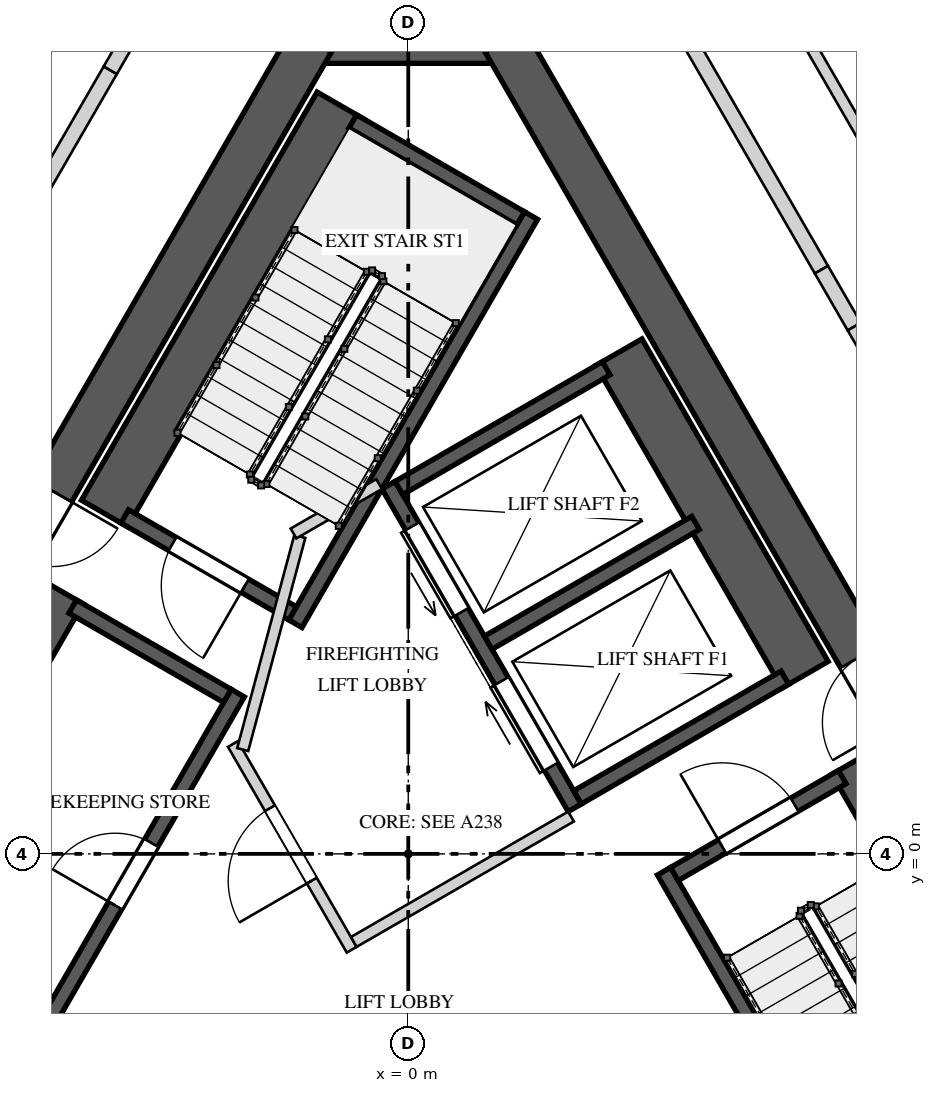
"""IFC4 building model, lengths in metres.
Left out: names, types, materials, properties, quantities, classifications, styles, units other than length and angle.
Written with IfcOpenShell. Run it as: python <this file> out.ifc"""

import sys

from ifc_helpers import new_model, si_unit, direction, frame, frame_2d, origin, place, context, subcontext, project, spatial, rectangle, extrude, element, fill, save


model = new_model("IFC4")
c1 = context("Model", 3, precision=1e-05, world=origin(), true_north=direction((0.0, 1.0)))
c2 = subcontext(c1, "Body", "Model", "MODEL_VIEW")
j1 = project(units=[si_unit("LENGTHUNIT", "METRE"), si_unit("PLANEANGLEUNIT", "RADIAN")], contexts=[c1])
p1 = place(None, origin())
s1 = spatial("IfcSite", under=j1, at=p1, CompositionType="ELEMENT")
p2 = place(p1, origin())
s2 = spatial("IfcBuilding", under=s1, at=p2, CompositionType="ELEMENT")
p3 = place(p2, frame((0.0, 0.0, 274.4)))
s3 = spatial("IfcBuildingStorey", under=s2, at=p3, CompositionType="ELEMENT", Elevation=274.4)
p4 = place(p3, frame((1.443, 10.7, 0.0), z_axis=(0.0, 0.0, 1.0), x_axis=(-1.0, 0.0, 0.0)))
e1 = element("IfcWall", 1, at=p4, inside=s3, PredefinedType="SHEAR", context=c2, shape_type="SweptSolid", body=[
    extrude(rectangle(XDim=2.887, YDim=0.6, at=frame_2d((1.443, 0.0))), origin(), (0.0, 0.0, 1.0), 4.0),
])
p5 = place(p3, frame((-1.27, 10.7, 0.0), z_axis=(0.0, 0.0, 1.0), x_axis=(-0.499999536116, -0.866025671608, 0.0)))
e2 = element("IfcWall", 2, at=p5, inside=s3, PredefinedType="SHEAR", context=c2, shape_type="SweptSolid", body=[
    extrude(rectangle(XDim=17.263, YDim=0.6, at=frame_2d((8.631, 0.0))), origin(), (0.0, 0.0, 1.0), 4.0),
])
p6 = place(p5, frame((6.836, 0.0, 0.0)))
e3 = element("IfcOpeningElement", 3, at=p6, cuts=e2, PredefinedType="OPENING", context=c2, shape_type="SweptSolid", body=[
    extrude(rectangle(XDim=1.0, YDim=2.4, at=frame_2d((0.5, 1.2))), frame((0.0, 0.31, 0.0), z_axis=(0.0, -1.0, 0.0), x_axis=(1.0, 0.0, 0.0)), (0.0, 0.0, 1.0), 0.62),
])
p7 = place(p5, frame((15.034, 0.0, 0.0)))
e4 = element("IfcOpeningElement", 4, at=p7, cuts=e2, PredefinedType="OPENING", context=c2, shape_type="SweptSolid", body=[
    extrude(rectangle(XDim=0.8, YDim=2.1, at=frame_2d((0.4, 1.05))), frame((0.0, 0.31, 0.0), z_axis=(0.0, -1.0, 0.0), x_axis=(1.0, 0.0, 0.0)), (0.0, 0.0, 1.0), 0.62),
])
p8 = place(p3, frame((9.902, -4.25, 0.0), z_axis=(0.0, 0.0, 1.0), x_axis=(-0.499999536116, 0.866025671608, 0.0)))
e5 = element("IfcWall", 5, at=p8, inside=s3, PredefinedType="SHEAR", context=c2, shape_type="SweptSolid", body=[
    extrude(rectangle(XDim=17.263, YDim=0.6, at=frame_2d((8.631, 0.0))), origin(), (0.0, 0.0, 1.0), 4.0),
])
p9 = place(p8, frame((6.906, 0.0, 0.0)))
e6 = element("IfcOpeningElement", 6, at=p9, cuts=e5, PredefinedType="OPENING", context=c2, shape_type="SweptSolid", body=[
    extrude(rectangle(XDim=1.0, YDim=2.4, at=frame_2d((0.5, 1.2))), frame((0.0, 0.31, 0.0), z_axis=(0.0, -1.0, 0.0), x_axis=(1.0, 0.0, 0.0)), (0.0, 0.0, 1.0), 0.62),
])
p10 = place(p3, frame((-0.896, 9.847, 0.0), z_axis=(0.0, 0.0, 1.0), x_axis=(-0.500009909098, -0.866019682689, 0.0)))
e7 = element("IfcWall", 7, at=p10, inside=s3, PredefinedType="SOLIDWALL", context=c2, shape_type="SweptSolid", body=[
    extrude(rectangle(XDim=6.2, YDim=0.7, at=frame_2d((3.1, 0.0))), origin(), (0.0, 0.0, 1.0), 3.65),
])
p11 = place(p3, frame((1.615, 8.397, 0.0), z_axis=(0.0, 0.0, 1.0), x_axis=(-0.500009909098, -0.866019682689, 0.0)))
e8 = element("IfcWall", 8, at=p11, inside=s3, PredefinedType="SOLIDWALL", context=c2, shape_type="SweptSolid", body=[
    extrude(rectangle(XDim=6.2, YDim=0.2, at=frame_2d((3.1, 0.0))), origin(), (0.0, 0.0, 1.0), 3.65),
])
p12 = place(p3, frame((1.479, 8.361, 0.0), z_axis=(0.0, 0.0, 1.0), x_axis=(-0.865989465428, 0.500062241894, 0.0)))
e9 = element("IfcWall", 9, at=p12, inside=s3, PredefinedType="SOLIDWALL", context=c2, shape_type="SweptSolid", body=[
    extrude(rectangle(XDim=2.55, YDim=0.2, at=frame_2d((1.275, 0.0))), origin(), (0.0, 0.0, 1.0), 3.65),
])
p13 = place(p3, frame((-1.521, 3.165, 0.0), z_axis=(0.0, 0.0, 1.0), x_axis=(-0.866030925526, 0.499990435942, 0.0)))
e10 = element("IfcWall", 10, at=p13, inside=s3, PredefinedType="SOLIDWALL", context=c2, shape_type="SweptSolid", body=[
    extrude(rectangle(XDim=2.55, YDim=0.2, at=frame_2d((1.275, 0.0))), origin(), (0.0, 0.0, 1.0), 3.65),
])
p14 = place(p13, frame((0.725, 0.0, 0.0)))
e11 = element("IfcOpeningElement", 11, at=p14, cuts=e10, PredefinedType="OPENING", context=c2, shape_type="SweptSolid", body=[
    extrude(rectangle(XDim=1.1, YDim=2.4, at=frame_2d((0.55, 1.2))), frame((0.0, 0.11, 0.0), z_axis=(0.0, -1.0, 0.0), x_axis=(1.0, 0.0, 0.0)), (0.0, 0.0, 1.0), 0.22),
])
p15 = place(p3, frame((8.976, -4.147, 0.0), z_axis=(0.0, 0.0, 1.0), x_axis=(-0.49998037582, 0.866036733513, 0.0)))
e12 = element("IfcWall", 12, at=p15, inside=s3, PredefinedType="SOLIDWALL", context=c2, shape_type="SweptSolid", body=[
    extrude(rectangle(XDim=6.2, YDim=0.7, at=frame_2d((3.1, 0.0))), origin(), (0.0, 0.0, 1.0), 3.65),
])
p16 = place(p3, frame((6.465, -5.597, 0.0), z_axis=(0.0, 0.0, 1.0), x_axis=(-0.49998037582, 0.866036733513, 0.0)))
e13 = element("IfcWall", 13, at=p16, inside=s3, PredefinedType="SOLIDWALL", context=c2, shape_type="SweptSolid", body=[
    extrude(rectangle(XDim=6.2, YDim=0.2, at=frame_2d((3.1, 0.0))), origin(), (0.0, 0.0, 1.0), 3.65),
])
p17 = place(p3, frame((3.501, -0.265, 0.0), z_axis=(0.0, 0.0, 1.0), x_axis=(0.866030925526, 0.499990435942, 0.0)))
e14 = element("IfcWall", 14, at=p17, inside=s3, PredefinedType="SOLIDWALL", context=c2, shape_type="SweptSolid", body=[
    extrude(rectangle(XDim=2.55, YDim=0.2, at=frame_2d((1.275, 0.0))), origin(), (0.0, 0.0, 1.0), 3.65),
])
p18 = place(p17, frame((0.725, 0.0, 0.0)))
e15 = element("IfcOpeningElement", 15, at=p18, cuts=e14, PredefinedType="OPENING", context=c2, shape_type="SweptSolid", body=[
    extrude(rectangle(XDim=1.1, YDim=2.4, at=frame_2d((0.55, 1.2))), frame((0.0, 0.11, 0.0), z_axis=(0.0, -1.0, 0.0), x_axis=(1.0, 0.0, 0.0)), (0.0, 0.0, 1.0), 0.22),
])
p19 = place(p3, frame((-4.993, -2.648, 0.0), z_axis=(0.0, 0.0, 1.0), x_axis=(0.499996545922, 0.866027397988, 0.0)))
e16 = element("IfcWall", 16, at=p19, inside=s3, PredefinedType="SOLIDWALL", context=c2, shape_type="SweptSolid", body=[
    extrude(rectangle(XDim=5.5, YDim=0.2, at=frame_2d((2.75, 0.0))), origin(), (0.0, 0.0, 1.0), 3.65),
])
p20 = place(p19, frame((2.275, 0.0, 0.0)))
e17 = element("IfcOpeningElement", 17, at=p20, cuts=e16, PredefinedType="OPENING", context=c2, shape_type="SweptSolid", body=[
    extrude(rectangle(XDim=0.95, YDim=2.4, at=frame_2d((0.475, 1.2))), frame((0.0, 0.11, 0.0), z_axis=(0.0, -1.0, 0.0), x_axis=(1.0, 0.0, 0.0)), (0.0, 0.0, 1.0), 0.22),
])
p21 = place(p3, frame((-4.581, 3.465, 0.0), z_axis=(0.0, 0.0, 1.0), x_axis=(-0.499996545922, -0.866027397988, 0.0)))
e18 = element("IfcWall", 18, at=p21, inside=s3, PredefinedType="SOLIDWALL", context=c2, shape_type="SweptSolid", body=[
    extrude(rectangle(XDim=5.5, YDim=0.7, at=frame_2d((2.75, 0.0))), origin(), (0.0, 0.0, 1.0), 3.65),
])
p22 = place(p3, frame((-2.38, 2.078, 0.0), z_axis=(0.0, 0.0, 1.0), x_axis=(-0.866061024631, 0.499938297808, 0.0)))
e19 = element("IfcWall", 19, at=p22, inside=s3, PredefinedType="SOLIDWALL", context=c2, shape_type="SweptSolid", body=[
    extrude(rectangle(XDim=2.35, YDim=0.2, at=frame_2d((1.175, 0.0))), origin(), (0.0, 0.0, 1.0), 3.65),
])
p23 = place(p3, frame((2.19, 0.606, 0.0), z_axis=(0.0, 0.0, 1.0), x_axis=(-0.500002801628, 0.866023786258, 0.0)))
e20 = element("IfcWall", 20, at=p23, inside=s3, PredefinedType="SOLIDWALL", context=c2, shape_type="SweptSolid", body=[
    extrude(rectangle(XDim=4.9, YDim=0.2, at=frame_2d((2.45, 0.0))), origin(), (0.0, 0.0, 1.0), 3.65),
])
p24 = place(p23, frame((0.625, 0.0, 0.0)))
e21 = element("IfcOpeningElement", 21, at=p24, cuts=e20, PredefinedType="OPENING", context=c2, shape_type="SweptSolid", body=[
    extrude(rectangle(XDim=1.3, YDim=2.1, at=frame_2d((0.65, 1.05))), frame((0.0, 0.11, 0.0), z_axis=(0.0, -1.0, 0.0), x_axis=(1.0, 0.0, 0.0)), (0.0, 0.0, 1.0), 0.22),
])
p25 = place(p23, frame((2.975, 0.0, 0.0)))
e22 = element("IfcOpeningElement", 22, at=p25, cuts=e20, PredefinedType="OPENING", context=c2, shape_type="SweptSolid", body=[
    extrude(rectangle(XDim=1.3, YDim=2.1, at=frame_2d((0.65, 1.05))), frame((0.0, 0.11, 0.0), z_axis=(0.0, -1.0, 0.0), x_axis=(1.0, 0.0, 0.0)), (0.0, 0.0, 1.0), 0.22),
])
p26 = place(p3, frame((5.221, 2.356, 0.0), z_axis=(0.0, 0.0, 1.0), x_axis=(-0.500040169509, 0.866002210665, 0.0)))
e23 = element("IfcWall", 23, at=p26, inside=s3, PredefinedType="SOLIDWALL", context=c2, shape_type="SweptSolid", body=[
    extrude(rectangle(XDim=4.9, YDim=0.7, at=frame_2d((2.45, 0.0))), origin(), (0.0, 0.0, 1.0), 3.65),
])
for number, where, z_axis, x_axis in (
    (24, (2.227, 0.743, 0.0), (0.0, 0.0, 1.0), (0.866, 0.5, 0.0)),
    (25, (1.052, 2.778, 0.0), (0.0, 0.0, 1.0), (0.866, 0.5, 0.0)),
    (26, (-0.123, 4.813, 0.0), (0.0, 0.0, 1.0), (0.866, 0.5, 0.0)),
):
    element("IfcWall", number, at=place(p3, frame(where, z_axis=z_axis, x_axis=x_axis)), inside=s3, PredefinedType="SOLIDWALL", context=c2, shape_type="SweptSolid", body=[
        extrude(rectangle(XDim=3.15, YDim=0.2, at=frame_2d((1.575, 0.0))), origin(), (0.0, 0.0, 1.0), 3.65),
    ])
p27 = place(p3, frame((-0.744, -1.261, 0.0), z_axis=(0.0, 0.0, 1.0), x_axis=(-0.500004234368, 0.866022959057, 0.0)))
e27 = element("IfcWall", 27, at=p27, inside=s3, PredefinedType="PARTITIONING", context=c2, shape_type="SweptSolid", body=[
    extrude(rectangle(XDim=3.125, YDim=0.15, at=frame_2d((1.562, 0.0))), origin(), (0.0, 0.0, 1.0), 3.65),
])
p28 = place(p27, frame((1.05, 0.0, 0.0)))
e28 = element("IfcOpeningElement", 28, at=p28, cuts=e27, PredefinedType="OPENING", context=c2, shape_type="SweptSolid", body=[
    extrude(rectangle(XDim=1.1, YDim=2.4, at=frame_2d((0.55, 1.2))), frame((0.0, 0.085, 0.0), z_axis=(0.0, -1.0, 0.0), x_axis=(1.0, 0.0, 0.0)), (0.0, 0.0, 1.0), 0.17),
])
p29 = place(p3, frame((-0.717, -1.159, 0.0), z_axis=(0.0, 0.0, 1.0), x_axis=(0.866008176907, 0.50002983664, 0.0)))
e29 = element("IfcWall", 29, at=p29, inside=s3, PredefinedType="PARTITIONING", context=c2, shape_type="SweptSolid", body=[
    extrude(rectangle(XDim=3.3, YDim=0.15, at=frame_2d((1.65, 0.0))), origin(), (0.0, 0.0, 1.0), 3.65),
])
p30 = place(p3, frame((-2.178, 1.372, 0.0), z_axis=(0.0, 0.0, 1.0), x_axis=(0.258808958833, 0.96592852884, 0.0)))
e30 = element("IfcWall", 30, at=p30, inside=s3, PredefinedType="PARTITIONING", context=c2, shape_type="SweptSolid", body=[
    extrude(rectangle(XDim=2.903, YDim=0.15, at=frame_2d((1.451, 0.0))), origin(), (0.0, 0.0, 1.0), 3.65),
])
p31 = place(p3, frame((-1.51, 4.215, 0.0), z_axis=(0.0, 0.0, 1.0), x_axis=(0.866085525409, 0.49989585183, 0.0)))
e31 = element("IfcWall", 31, at=p31, inside=s3, PredefinedType="PARTITIONING", context=c2, shape_type="SweptSolid", body=[
    extrude(rectangle(XDim=1.3, YDim=0.15, at=frame_2d((0.65, 0.0))), origin(), (0.0, 0.0, 1.0), 3.65),
])
p32 = place(p3, frame((-6.925, 7.806, 0.0), z_axis=(0.0, 0.0, 1.0), x_axis=(0.500024628788, 0.86601118388, 0.0)))
e32 = element("IfcWall", 32, at=p32, inside=s3, PredefinedType="PARTITIONING", context=c2, shape_type="SweptSolid", body=[
    extrude(rectangle(XDim=4.406, YDim=0.15, at=frame_2d((2.203, 0.0))), origin(), (0.0, 0.0, 1.0), 3.65),
])
p33 = place(p32, frame((0.524, 0.0, 0.0)))
e33 = element("IfcOpeningElement", 33, at=p33, cuts=e32, PredefinedType="OPENING", context=c2, shape_type="SweptSolid", body=[
    extrude(rectangle(XDim=0.95, YDim=2.4, at=frame_2d((0.475, 1.2))), frame((0.0, 0.085, 0.0), z_axis=(0.0, -1.0, 0.0), x_axis=(1.0, 0.0, 0.0)), (0.0, 0.0, 1.0), 0.17),
])
p34 = place(p3, frame((3.513, 13.715, 0.0), z_axis=(0.0, 0.0, 1.0), x_axis=(0.500019542665, -0.866014120528, 0.0)))
e34 = element("IfcWall", 34, at=p34, inside=s3, PredefinedType="PARTITIONING", context=c2, shape_type="SweptSolid", body=[
    extrude(rectangle(XDim=5.643, YDim=0.15, at=frame_2d((2.822, 0.0))), origin(), (0.0, 0.0, 1.0), 3.65),
])
p35 = place(p34, frame((2.422, 0.0, 0.0)))
e35 = element("IfcOpeningElement", 35, at=p35, cuts=e34, PredefinedType="OPENING", context=c2, shape_type="SweptSolid", body=[
    extrude(rectangle(XDim=0.95, YDim=2.4, at=frame_2d((0.475, 1.2))), frame((0.0, 0.085, 0.0), z_axis=(0.0, -1.0, 0.0), x_axis=(1.0, 0.0, 0.0)), (0.0, 0.0, 1.0), 0.17),
])
p36 = place(p3, frame((-5.947, 6.801, 0.0), z_axis=(0.0, 0.0, 1.0), x_axis=(0.500007556608, 0.866021040931, 0.0)))
e36 = element("IfcWall", 36, at=p36, inside=s3, PredefinedType="SOLIDWALL", context=c2, shape_type="SweptSolid", body=[
    extrude(rectangle(XDim=4.052, YDim=0.2, at=frame_2d((2.026, 0.0))), origin(), (0.0, 0.0, 1.0), 3.65),
])
p37 = place(p3, frame((-3.92, 10.31, 0.0), z_axis=(0.0, 0.0, 1.0), x_axis=(0.500102178127, 0.865966403178, 0.0)))
e37 = element("IfcWall", 37, at=p37, inside=s3, PredefinedType="SOLIDWALL", context=c2, shape_type="SweptSolid", body=[
    extrude(rectangle(XDim=0.927, YDim=0.2, at=frame_2d((0.464, 0.0))), origin(), (0.0, 0.0, 1.0), 2.95),
])
p38 = place(p3, frame((3.077, 11.771, 0.0), z_axis=(0.0, 0.0, 1.0), x_axis=(0.500007683529, -0.866020967652, 0.0)))
e38 = element("IfcWall", 38, at=p38, inside=s3, PredefinedType="SOLIDWALL", context=c2, shape_type="SweptSolid", body=[
    extrude(rectangle(XDim=4.717, YDim=0.2, at=frame_2d((2.359, 0.0))), origin(), (0.0, 0.0, 1.0), 3.65),
])
p39 = place(p3, frame((5.436, 7.686, 0.0), z_axis=(0.0, 0.0, 1.0), x_axis=(0.500056482814, -0.86599279096, 0.0)))
e39 = element("IfcWall", 39, at=p39, inside=s3, PredefinedType="SOLIDWALL", context=c2, shape_type="SweptSolid", body=[
    extrude(rectangle(XDim=0.865, YDim=0.2, at=frame_2d((0.432, 0.0))), origin(), (0.0, 0.0, 1.0), 2.75),
])
p40 = place(p3, frame((5.868, 6.937, 0.0), z_axis=(0.0, 0.0, 1.0), x_axis=(0.499857464265, -0.866107681191, 0.0)))
e40 = element("IfcWall", 40, at=p40, inside=s3, PredefinedType="SOLIDWALL", context=c2, shape_type="SweptSolid", body=[
    extrude(rectangle(XDim=0.939, YDim=0.2, at=frame_2d((0.47, 0.0))), origin(), (0.0, 0.0, 1.0), 3.65),
])
p41 = place(p14, origin())
e41 = element("IfcDoor", 41, at=p41, inside=s3, OperationType="SINGLE_SWING_RIGHT", PredefinedType="DOOR", context=c2, shape_type="SweptSolid", body=[
    extrude(rectangle(XDim=1.1, YDim=2.4, at=frame_2d((0.55, 1.2))), frame((0.0, 0.025, 0.0), z_axis=(0.0, -1.0, 0.0), x_axis=(1.0, 0.0, 0.0)), (0.0, 0.0, 1.0), 0.05),
])
fill(e11, e41)
p42 = place(p18, origin())
e42 = element("IfcDoor", 42, at=p42, inside=s3, OperationType="SINGLE_SWING_RIGHT", PredefinedType="DOOR", context=c2, shape_type="SweptSolid", body=[
    extrude(rectangle(XDim=1.1, YDim=2.4, at=frame_2d((0.55, 1.2))), frame((0.0, 0.025, 0.0), z_axis=(0.0, -1.0, 0.0), x_axis=(1.0, 0.0, 0.0)), (0.0, 0.0, 1.0), 0.05),
])
fill(e15, e42)
p43 = place(p20, origin())
e43 = element("IfcDoor", 43, at=p43, inside=s3, OperationType="SINGLE_SWING_LEFT", PredefinedType="DOOR", context=c2, shape_type="SweptSolid", body=[
    extrude(rectangle(XDim=0.95, YDim=2.4, at=frame_2d((0.475, 1.2))), frame((0.0, 0.025, 0.0), z_axis=(0.0, -1.0, 0.0), x_axis=(1.0, 0.0, 0.0)), (0.0, 0.0, 1.0), 0.05),
])
fill(e17, e43)
p44 = place(p24, origin())
e44 = element("IfcDoor", 44, at=p44, inside=s3, OperationType="SLIDING_TO_RIGHT", PredefinedType="DOOR", context=c2, shape_type="SweptSolid", body=[
    extrude(rectangle(XDim=1.3, YDim=2.1, at=frame_2d((0.65, 1.05))), frame((0.0, 0.025, 0.0), z_axis=(0.0, -1.0, 0.0), x_axis=(1.0, 0.0, 0.0)), (0.0, 0.0, 1.0), 0.05),
])
fill(e21, e44)
p45 = place(p25, origin())
e45 = element("IfcDoor", 45, at=p45, inside=s3, OperationType="SLIDING_TO_LEFT", PredefinedType="DOOR", context=c2, shape_type="SweptSolid", body=[
    extrude(rectangle(XDim=1.3, YDim=2.1, at=frame_2d((0.65, 1.05))), frame((0.0, 0.025, 0.0), z_axis=(0.0, -1.0, 0.0), x_axis=(1.0, 0.0, 0.0)), (0.0, 0.0, 1.0), 0.05),
])
fill(e22, e45)
p46 = place(p28, origin())
e46 = element("IfcDoor", 46, at=p46, inside=s3, OperationType="SINGLE_SWING_RIGHT", PredefinedType="DOOR", context=c2, shape_type="SweptSolid", body=[
    extrude(rectangle(XDim=1.1, YDim=2.4, at=frame_2d((0.55, 1.2))), frame((0.0, 0.025, 0.0), z_axis=(0.0, -1.0, 0.0), x_axis=(1.0, 0.0, 0.0)), (0.0, 0.0, 1.0), 0.05),
])
fill(e28, e46)
p47 = place(p6, origin())
e47 = element("IfcDoor", 47, at=p47, inside=s3, OperationType="SINGLE_SWING_LEFT", PredefinedType="DOOR", context=c2, shape_type="SweptSolid", body=[
    extrude(rectangle(XDim=1.0, YDim=2.4, at=frame_2d((0.5, 1.2))), frame((0.0, 0.025, 0.0), z_axis=(0.0, -1.0, 0.0), x_axis=(1.0, 0.0, 0.0)), (0.0, 0.0, 1.0), 0.05),
])
fill(e3, e47)
save(model, sys.argv[1])
